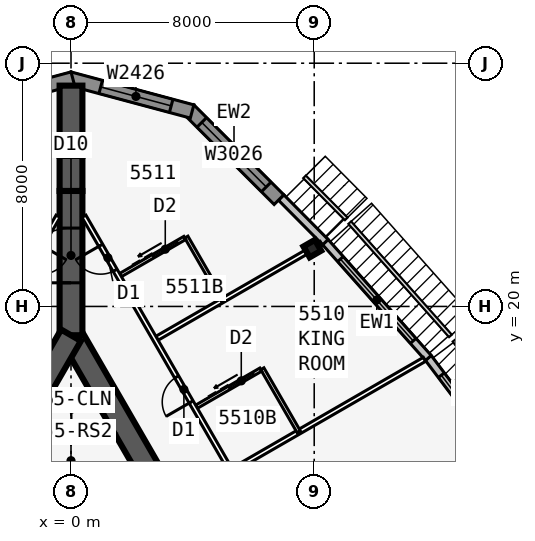
"""IFC4 building model, lengths in metres.
Left out: names, types, materials, properties, quantities, classifications, styles, units other than length and angle.
Written with IfcOpenShell. Run it as: python <this file> out.ifc"""

import sys

from ifc_helpers import new_model, si_unit, direction, frame, frame_2d, origin, origin_2d, place, context, subcontext, project, spatial, polyline, rectangle, i_section, outline, extrude, element, fill, save


model = new_model("IFC4")
c1 = context("Model", 3, precision=1e-05, world=origin(), true_north=direction((0.0, 1.0)))
c2 = subcontext(c1, "Body", "Model", "MODEL_VIEW")
j1 = project(units=[si_unit("LENGTHUNIT", "METRE"), si_unit("PLANEANGLEUNIT", "RADIAN")], contexts=[c1])
p1 = place(None, origin())
s1 = spatial("IfcSite", under=j1, at=p1, CompositionType="ELEMENT")
p2 = place(p1, origin())
s2 = spatial("IfcBuilding", under=s1, at=p2, CompositionType="ELEMENT")
p3 = place(p2, frame((0.0, 0.0, 208.1)))
s3 = spatial("IfcBuildingStorey", under=s2, at=p3, CompositionType="ELEMENT", Elevation=208.1)
p4 = place(p3, frame((16.5, -9.526, 0.0), z_axis=(0.0, 0.0, 1.0), x_axis=(-0.499999749417, 0.866025548458, 0.0)))
e1 = element("IfcWall", 1, at=p4, inside=s3, PredefinedType="SHEAR", context=c2, shape_type="SweptSolid", body=[
    extrude(rectangle(XDim=33.0, YDim=0.75, at=frame_2d((16.5, 0.0))), origin(), (0.0, 0.0, 1.0), 3.6),
])
p5 = place(p4, frame((14.15, 0.0, 0.0)))
e2 = element("IfcOpeningElement", 2, at=p5, cuts=e1, PredefinedType="OPENING", context=c2, shape_type="SweptSolid", body=[
    extrude(rectangle(XDim=1.8, YDim=2.13, at=frame_2d((0.9, 1.065))), frame((0.0, 0.385, 0.0), z_axis=(0.0, -1.0, 0.0), x_axis=(1.0, 0.0, 0.0)), (0.0, 0.0, 1.0), 0.77),
])
p6 = place(p4, frame((12.6, 0.0, 0.0)))
e3 = element("IfcOpeningElement", 3, at=p6, cuts=e1, PredefinedType="OPENING", context=c2, shape_type="SweptSolid", body=[
    extrude(rectangle(XDim=1.0, YDim=2.13, at=frame_2d((0.5, 1.065))), frame((0.0, 0.385, 0.0), z_axis=(0.0, -1.0, 0.0), x_axis=(1.0, 0.0, 0.0)), (0.0, 0.0, 1.0), 0.77),
])
p7 = place(p3, frame((0.0, 19.052, 0.0), z_axis=(0.0, 0.0, 1.0), x_axis=(-0.499999749417, -0.866025548458, 0.0)))
e4 = element("IfcWall", 4, at=p7, inside=s3, PredefinedType="SHEAR", context=c2, shape_type="SweptSolid", body=[
    extrude(rectangle(XDim=33.0, YDim=0.75, at=frame_2d((16.5, 0.0))), origin(), (0.0, 0.0, 1.0), 3.6),
])
p8 = place(p7, frame((14.15, 0.0, 0.0)))
e5 = element("IfcOpeningElement", 5, at=p8, cuts=e4, PredefinedType="OPENING", context=c2, shape_type="SweptSolid", body=[
    extrude(rectangle(XDim=1.8, YDim=2.13, at=frame_2d((0.9, 1.065))), frame((0.0, 0.385, 0.0), z_axis=(0.0, -1.0, 0.0), x_axis=(1.0, 0.0, 0.0)), (0.0, 0.0, 1.0), 0.77),
])
p9 = place(p7, frame((12.6, 0.0, 0.0)))
e6 = element("IfcOpeningElement", 6, at=p9, cuts=e4, PredefinedType="OPENING", context=c2, shape_type="SweptSolid", body=[
    extrude(rectangle(XDim=1.0, YDim=2.13, at=frame_2d((0.5, 1.065))), frame((0.0, 0.385, 0.0), z_axis=(0.0, -1.0, 0.0), x_axis=(1.0, 0.0, 0.0)), (0.0, 0.0, 1.0), 0.77),
])
p10 = place(p3, frame((0.0, 19.052, 0.0), z_axis=(0.0, 0.0, 1.0), x_axis=(0.0, 1.0, 0.0)))
e7 = element("IfcWall", 7, at=p10, inside=s3, PredefinedType="SHEAR", context=c2, shape_type="SweptSolid", body=[
    extrude(rectangle(XDim=4.746, YDim=0.75, at=frame_2d((2.373, 0.0))), origin(), (0.0, 0.0, 1.0), 3.6),
])
p11 = place(p10, frame((1.725, 0.0, 0.0)))
e8 = element("IfcOpeningElement", 8, at=p11, cuts=e7, PredefinedType="OPENING", context=c2, shape_type="SweptSolid", body=[
    extrude(rectangle(XDim=1.8, YDim=2.13, at=frame_2d((0.9, 1.065))), frame((0.0, 0.385, 0.0), z_axis=(0.0, -1.0, 0.0), x_axis=(1.0, 0.0, 0.0)), (0.0, 0.0, 1.0), 0.77),
])
p12 = place(p3, frame((0.0, 23.799, 0.0), z_axis=(0.0, 0.0, 1.0), x_axis=(0.0, 1.0, 0.0)))
e9 = element("IfcWall", 9, at=p12, inside=s3, PredefinedType="SHEAR", context=c2, shape_type="SweptSolid", body=[
    extrude(rectangle(XDim=1.155, YDim=0.75, at=frame_2d((0.577, 0.0))), origin(), (0.0, 0.0, 1.0), 3.6),
])
p13 = place(p3, frame((0.0, 24.953, 0.0), z_axis=(0.0, 0.0, 1.0), x_axis=(0.0, 1.0, 0.0)))
e10 = element("IfcWall", 10, at=p13, inside=s3, PredefinedType="SHEAR", context=c2, shape_type="SweptSolid", body=[
    extrude(rectangle(XDim=2.309, YDim=0.75, at=frame_2d((1.155, 0.0))), origin(), (0.0, 0.0, 1.0), 3.6),
])
p14 = place(p3, frame((7.937, 21.903, 0.0), z_axis=(0.0, 0.0, 1.0), x_axis=(-0.5, 0.866025403784, 0.0)))
e11 = element("IfcColumn", 11, at=p14, inside=s3, PredefinedType="COLUMN", context=c2, shape_type="SweptSolid", body=[
    extrude(i_section(OverallWidth=0.411, OverallDepth=0.434, WebThickness=0.036, FlangeThickness=0.057, at=origin_2d()), origin(), (0.0, 0.0, 1.0), 3.6),
])
p15 = place(p3, frame((14.783, 14.291, 0.0), z_axis=(0.0, 0.0, 1.0), x_axis=(-0.602408653511, 0.798187831388, 0.0)))
e12 = element("IfcWall", 12, at=p15, inside=s3, PredefinedType="STANDARD", context=c2, shape_type="SweptSolid", body=[
    extrude(rectangle(XDim=5.038, YDim=0.25, at=frame_2d((2.519, 0.0))), origin(), (0.0, 0.0, 1.0), 3.435),
])
p16 = place(p15, frame((0.719, 0.0, 0.45)))
e13 = element("IfcOpeningElement", 13, at=p16, cuts=e12, PredefinedType="OPENING", context=c2, shape_type="SweptSolid", body=[
    extrude(rectangle(XDim=3.6, YDim=2.6, at=frame_2d((1.8, 1.3))), frame((0.0, 0.135, 0.0), z_axis=(0.0, -1.0, 0.0), x_axis=(1.0, 0.0, 0.0)), (0.0, 0.0, 1.0), 0.27),
])
p17 = place(p3, frame((11.754, 18.304, 0.0), z_axis=(0.0, 0.0, 1.0), x_axis=(-0.664348996191, 0.747422511876, 0.0)))
e14 = element("IfcWall", 14, at=p17, inside=s3, PredefinedType="STANDARD", context=c2, shape_type="SweptSolid", body=[
    extrude(rectangle(XDim=5.105, YDim=0.25, at=frame_2d((2.552, 0.0))), origin(), (0.0, 0.0, 1.0), 3.435),
])
p18 = place(p17, frame((0.752, 0.0, 0.45)))
e15 = element("IfcOpeningElement", 15, at=p18, cuts=e14, PredefinedType="OPENING", context=c2, shape_type="SweptSolid", body=[
    extrude(rectangle(XDim=3.6, YDim=2.6, at=frame_2d((1.8, 1.3))), frame((0.0, 0.135, 0.0), z_axis=(0.0, -1.0, 0.0), x_axis=(1.0, 0.0, 0.0)), (0.0, 0.0, 1.0), 0.27),
])
p19 = place(p3, frame((8.368, 22.115, 0.0), z_axis=(0.0, 0.0, 1.0), x_axis=(-0.704149946111, 0.710051303352, 0.0)))
e16 = element("IfcWall", 16, at=p19, inside=s3, PredefinedType="STANDARD", context=c2, shape_type="SweptSolid", body=[
    extrude(rectangle(XDim=2.069, YDim=0.25, at=frame_2d((1.034, 0.0))), origin(), (0.0, 0.0, 1.0), 3.435),
])
p20 = place(p3, frame((6.841, 23.512, 0.0), z_axis=(0.0, 0.0, 1.0), x_axis=(-0.707106781187, 0.707106781187, 0.0)))
e17 = element("IfcWall", 17, at=p20, inside=s3, PredefinedType="SOLIDWALL", context=c2, shape_type="SweptSolid", body=[
    extrude(rectangle(XDim=4.184, YDim=0.45, at=frame_2d((2.092, 0.0))), origin(), (0.0, 0.0, 1.0), 3.435),
])
p21 = place(p20, frame((0.592, 0.0, 0.45)))
e18 = element("IfcOpeningElement", 18, at=p21, cuts=e17, PredefinedType="OPENING", context=c2, shape_type="SweptSolid", body=[
    extrude(rectangle(XDim=3.0, YDim=2.6, at=frame_2d((1.5, 1.3))), frame((0.0, 0.235, 0.0), z_axis=(0.0, -1.0, 0.0), x_axis=(1.0, 0.0, 0.0)), (0.0, 0.0, 1.0), 0.47),
])
p22 = place(p3, frame((3.983, 26.413, 0.0), z_axis=(0.0, 0.0, 1.0), x_axis=(-0.965920442324, 0.258839137498, 0.0)))
e19 = element("IfcWall", 19, at=p22, inside=s3, PredefinedType="SOLIDWALL", context=c2, shape_type="SweptSolid", body=[
    extrude(outline(polyline([(4.184, 0.225), (4.124, 0.225), (3.706, 0.113), (3.676, 0.225), (0.0, 0.225), (0.0, -0.225), (4.184, -0.225), (4.184, 0.225)])), origin(), (0.0, 0.0, 1.0), 3.435),
])
p23 = place(p22, frame((0.713, 0.0, 0.45)))
e20 = element("IfcOpeningElement", 20, at=p23, cuts=e19, PredefinedType="OPENING", context=c2, shape_type="SweptSolid", body=[
    extrude(rectangle(XDim=2.4, YDim=2.6, at=frame_2d((1.2, 1.3))), frame((0.0, 0.235, 0.0), z_axis=(0.0, -1.0, 0.0), x_axis=(1.0, 0.0, 0.0)), (0.0, 0.0, 1.0), 0.47),
])
p24 = place(p3, frame((0.058, 27.496, 0.0), z_axis=(0.0, 0.0, 1.0), x_axis=(-0.965920442324, -0.258839137498, 0.0)))
e21 = element("IfcWall", 21, at=p24, inside=s3, PredefinedType="SOLIDWALL", context=c2, shape_type="SweptSolid", body=[
    extrude(outline(polyline([(4.184, 0.225), (0.509, 0.225), (0.479, 0.113), (0.06, 0.225), (0.0, 0.225), (0.0, -0.225), (4.184, -0.225), (4.184, 0.225)])), origin(), (0.0, 0.0, 1.0), 3.435),
])
p25 = place(p24, frame((1.071, 0.0, 0.45)))
e22 = element("IfcOpeningElement", 22, at=p25, cuts=e21, PredefinedType="OPENING", context=c2, shape_type="SweptSolid", body=[
    extrude(rectangle(XDim=2.4, YDim=2.6, at=frame_2d((1.2, 1.3))), frame((0.0, 0.235, 0.0), z_axis=(0.0, -1.0, 0.0), x_axis=(1.0, 0.0, 0.0)), (0.0, 0.0, 1.0), 0.47),
])
p26 = place(p3, frame((20.102, -11.115, 0.0), z_axis=(0.0, 0.0, 1.0), x_axis=(-0.500000265775, 0.866025250339, 0.0)))
e23 = element("IfcWall", 23, at=p26, inside=s3, PredefinedType="PARTITIONING", context=c2, shape_type="SweptSolid", body=[
    extrude(rectangle(XDim=39.354, YDim=0.15, at=frame_2d((19.677, 0.0))), origin(), (0.0, 0.0, 1.0), 3.435),
])
p27 = place(p26, frame((1.665, 0.0, 0.0)))
e24 = element("IfcOpeningElement", 24, at=p27, cuts=e23, PredefinedType="OPENING", context=c2, shape_type="SweptSolid", body=[
    extrude(rectangle(XDim=0.95, YDim=2.13, at=frame_2d((0.475, 1.065))), frame((0.0, 0.085, 0.0), z_axis=(0.0, -1.0, 0.0), x_axis=(1.0, 0.0, 0.0)), (0.0, 0.0, 1.0), 0.17),
])
p28 = place(p26, frame((12.902, 0.0, 0.0)))
e25 = element("IfcOpeningElement", 25, at=p28, cuts=e23, PredefinedType="OPENING", context=c2, shape_type="SweptSolid", body=[
    extrude(rectangle(XDim=0.95, YDim=2.13, at=frame_2d((0.475, 1.065))), frame((0.0, 0.085, 0.0), z_axis=(0.0, -1.0, 0.0), x_axis=(1.0, 0.0, 0.0)), (0.0, 0.0, 1.0), 0.17),
])
p29 = place(p26, frame((17.302, 0.0, 0.0)))
e26 = element("IfcOpeningElement", 26, at=p29, cuts=e23, PredefinedType="OPENING", context=c2, shape_type="SweptSolid", body=[
    extrude(rectangle(XDim=0.95, YDim=2.13, at=frame_2d((0.475, 1.065))), frame((0.0, 0.085, 0.0), z_axis=(0.0, -1.0, 0.0), x_axis=(1.0, 0.0, 0.0)), (0.0, 0.0, 1.0), 0.17),
])
p30 = place(p26, frame((22.902, 0.0, 0.0)))
e27 = element("IfcOpeningElement", 27, at=p30, cuts=e23, PredefinedType="OPENING", context=c2, shape_type="SweptSolid", body=[
    extrude(rectangle(XDim=0.95, YDim=2.13, at=frame_2d((0.475, 1.065))), frame((0.0, 0.085, 0.0), z_axis=(0.0, -1.0, 0.0), x_axis=(1.0, 0.0, 0.0)), (0.0, 0.0, 1.0), 0.17),
])
p31 = place(p26, frame((32.302, 0.0, 0.0)))
e28 = element("IfcOpeningElement", 28, at=p31, cuts=e23, PredefinedType="OPENING", context=c2, shape_type="SweptSolid", body=[
    extrude(rectangle(XDim=0.95, YDim=2.13, at=frame_2d((0.475, 1.065))), frame((0.0, 0.085, 0.0), z_axis=(0.0, -1.0, 0.0), x_axis=(1.0, 0.0, 0.0)), (0.0, 0.0, 1.0), 0.17),
])
p32 = place(p26, frame((37.302, 0.0, 0.0)))
e29 = element("IfcOpeningElement", 29, at=p32, cuts=e23, PredefinedType="OPENING", context=c2, shape_type="SweptSolid", body=[
    extrude(rectangle(XDim=0.95, YDim=2.13, at=frame_2d((0.475, 1.065))), frame((0.0, 0.085, 0.0), z_axis=(0.0, -1.0, 0.0), x_axis=(1.0, 0.0, 0.0)), (0.0, 0.0, 1.0), 0.17),
])
p33 = place(p3, frame((5.329, 14.623, 0.0), z_axis=(0.0, 0.0, 1.0), x_axis=(0.866017877653, 0.500013035415, 0.0)))
e30 = element("IfcWall", 30, at=p33, inside=s3, PredefinedType="PARTITIONING", context=c2, shape_type="SweptSolid", body=[
    extrude(rectangle(XDim=7.273, YDim=0.15, at=frame_2d((3.636, 0.0))), origin(), (0.0, 0.0, 1.0), 2.589),
])
p34 = place(p3, frame((2.829, 18.954, 0.0), z_axis=(0.0, 0.0, 1.0), x_axis=(0.866026604282, 0.499997920671, 0.0)))
e31 = element("IfcWall", 31, at=p34, inside=s3, PredefinedType="PARTITIONING", context=c2, shape_type="SweptSolid", body=[
    extrude(rectangle(XDim=6.24, YDim=0.15, at=frame_2d((3.12, 0.0))), origin(), (0.0, 0.0, 1.0), 2.589),
])
p35 = place(p3, frame((7.493, 15.873, 0.0), z_axis=(0.0, 0.0, 1.0), x_axis=(-0.499957262057, 0.866050077142, 0.0)))
e32 = element("IfcWall", 32, at=p35, inside=s3, PredefinedType="PLUMBINGWALL", context=c2, shape_type="SweptSolid", body=[
    extrude(rectangle(XDim=2.4, YDim=0.12, at=frame_2d((1.2, 0.0))), origin(), (0.0, 0.0, 1.0), 3.435),
])
p36 = place(p3, frame((4.128, 16.702, 0.0), z_axis=(0.0, 0.0, 1.0), x_axis=(0.866048967903, 0.499959183527, 0.0)))
e33 = element("IfcWall", 33, at=p36, inside=s3, PredefinedType="PLUMBINGWALL", context=c2, shape_type="SweptSolid", body=[
    extrude(rectangle(XDim=2.44, YDim=0.12, at=frame_2d((1.22, 0.0))), origin(), (0.0, 0.0, 1.0), 3.435),
])
p37 = place(p36, frame((1.25, 0.0, 0.0)))
e34 = element("IfcOpeningElement", 34, at=p37, cuts=e33, PredefinedType="OPENING", context=c2, shape_type="SweptSolid", body=[
    extrude(rectangle(XDim=0.9, YDim=2.13, at=frame_2d((0.45, 1.065))), frame((0.0, 0.07, 0.0), z_axis=(0.0, -1.0, 0.0), x_axis=(1.0, 0.0, 0.0)), (0.0, 0.0, 1.0), 0.14),
])
p38 = place(p3, frame((4.993, 20.204, 0.0), z_axis=(0.0, 0.0, 1.0), x_axis=(-0.500001309137, 0.866024647952, 0.0)))
e35 = element("IfcWall", 35, at=p38, inside=s3, PredefinedType="PLUMBINGWALL", context=c2, shape_type="SweptSolid", body=[
    extrude(rectangle(XDim=2.4, YDim=0.12, at=frame_2d((1.2, 0.0))), origin(), (0.0, 0.0, 1.0), 3.435),
])
p39 = place(p3, frame((1.628, 21.032, 0.0), z_axis=(0.0, 0.0, 1.0), x_axis=(0.866048967903, 0.499959183527, 0.0)))
e36 = element("IfcWall", 36, at=p39, inside=s3, PredefinedType="PLUMBINGWALL", context=c2, shape_type="SweptSolid", body=[
    extrude(rectangle(XDim=2.44, YDim=0.12, at=frame_2d((1.22, 0.0))), origin(), (0.0, 0.0, 1.0), 3.435),
])
p40 = place(p39, frame((1.25, 0.0, 0.0)))
e37 = element("IfcOpeningElement", 37, at=p40, cuts=e36, PredefinedType="OPENING", context=c2, shape_type="SweptSolid", body=[
    extrude(rectangle(XDim=0.9, YDim=2.13, at=frame_2d((0.45, 1.065))), frame((0.0, 0.07, 0.0), z_axis=(0.0, -1.0, 0.0), x_axis=(1.0, 0.0, 0.0)), (0.0, 0.0, 1.0), 0.14),
])
p41 = place(p3, frame((-0.425, 22.966, 0.0), z_axis=(0.0, 0.0, 1.0), x_axis=(-0.500000265775, -0.866025250339, 0.0)))
e38 = element("IfcWall", 38, at=p41, inside=s3, PredefinedType="PARTITIONING", context=c2, shape_type="SweptSolid", body=[
    extrude(rectangle(XDim=39.354, YDim=0.15, at=frame_2d((19.677, 0.0))), origin(), (0.0, 0.0, 1.0), 3.435),
])
p42 = place(p41, frame((1.102, 0.0, 0.0)))
e39 = element("IfcOpeningElement", 39, at=p42, cuts=e38, PredefinedType="OPENING", context=c2, shape_type="SweptSolid", body=[
    extrude(rectangle(XDim=0.95, YDim=2.13, at=frame_2d((0.475, 1.065))), frame((0.0, 0.085, 0.0), z_axis=(0.0, -1.0, 0.0), x_axis=(1.0, 0.0, 0.0)), (0.0, 0.0, 1.0), 0.17),
])
p43 = place(p41, frame((7.902, 0.0, 0.0)))
e40 = element("IfcOpeningElement", 40, at=p43, cuts=e38, PredefinedType="OPENING", context=c2, shape_type="SweptSolid", body=[
    extrude(rectangle(XDim=0.95, YDim=2.13, at=frame_2d((0.475, 1.065))), frame((0.0, 0.085, 0.0), z_axis=(0.0, -1.0, 0.0), x_axis=(1.0, 0.0, 0.0)), (0.0, 0.0, 1.0), 0.17),
])
p44 = place(p41, frame((17.302, 0.0, 0.0)))
e41 = element("IfcOpeningElement", 41, at=p44, cuts=e38, PredefinedType="OPENING", context=c2, shape_type="SweptSolid", body=[
    extrude(rectangle(XDim=0.95, YDim=2.13, at=frame_2d((0.475, 1.065))), frame((0.0, 0.085, 0.0), z_axis=(0.0, -1.0, 0.0), x_axis=(1.0, 0.0, 0.0)), (0.0, 0.0, 1.0), 0.17),
])
p45 = place(p41, frame((26.702, 0.0, 0.0)))
e42 = element("IfcOpeningElement", 42, at=p45, cuts=e38, PredefinedType="OPENING", context=c2, shape_type="SweptSolid", body=[
    extrude(rectangle(XDim=0.95, YDim=2.13, at=frame_2d((0.475, 1.065))), frame((0.0, 0.085, 0.0), z_axis=(0.0, -1.0, 0.0), x_axis=(1.0, 0.0, 0.0)), (0.0, 0.0, 1.0), 0.17),
])
p46 = place(p41, frame((37.302, 0.0, 0.0)))
e43 = element("IfcOpeningElement", 43, at=p46, cuts=e38, PredefinedType="OPENING", context=c2, shape_type="SweptSolid", body=[
    extrude(rectangle(XDim=0.95, YDim=2.13, at=frame_2d((0.475, 1.065))), frame((0.0, 0.085, 0.0), z_axis=(0.0, -1.0, 0.0), x_axis=(1.0, 0.0, 0.0)), (0.0, 0.0, 1.0), 0.17),
])
p47 = place(p3, frame((-1.501, 15.703, 0.0), z_axis=(0.0, 0.0, 1.0), x_axis=(1.0, 0.0, 0.0)))
e44 = element("IfcWall", 44, at=p47, inside=s3, PredefinedType="SOLIDWALL", context=c2, shape_type="SweptSolid", body=[
    extrude(rectangle(XDim=3.002, YDim=0.2, at=frame_2d((1.501, 0.0))), origin(), (0.0, 0.0, 1.0), 3.435),
])
p48 = place(p16, origin())
e45 = element("IfcWindow", 45, at=p48, inside=s3, PartitioningType="SINGLE_PANEL", PredefinedType="WINDOW", context=c2, shape_type="SweptSolid", body=[
    extrude(rectangle(XDim=3.6, YDim=2.6, at=frame_2d((1.8, 1.3))), frame((0.0, 0.03, 0.0), z_axis=(0.0, -1.0, 0.0), x_axis=(1.0, 0.0, 0.0)), (0.0, 0.0, 1.0), 0.06),
])
fill(e13, e45)
p49 = place(p18, origin())
e46 = element("IfcWindow", 46, at=p49, inside=s3, PartitioningType="SINGLE_PANEL", PredefinedType="WINDOW", context=c2, shape_type="SweptSolid", body=[
    extrude(rectangle(XDim=3.6, YDim=2.6, at=frame_2d((1.8, 1.3))), frame((0.0, 0.03, 0.0), z_axis=(0.0, -1.0, 0.0), x_axis=(1.0, 0.0, 0.0)), (0.0, 0.0, 1.0), 0.06),
])
fill(e15, e46)
p50 = place(p21, origin())
e47 = element("IfcWindow", 47, at=p50, inside=s3, PartitioningType="SINGLE_PANEL", PredefinedType="WINDOW", context=c2, shape_type="SweptSolid", body=[
    extrude(rectangle(XDim=3.0, YDim=2.6, at=frame_2d((1.5, 1.3))), frame((0.0, 0.03, 0.0), z_axis=(0.0, -1.0, 0.0), x_axis=(1.0, 0.0, 0.0)), (0.0, 0.0, 1.0), 0.06),
])
fill(e18, e47)
p51 = place(p23, origin())
e48 = element("IfcWindow", 48, at=p51, inside=s3, PartitioningType="SINGLE_PANEL", PredefinedType="WINDOW", context=c2, shape_type="SweptSolid", body=[
    extrude(rectangle(XDim=2.4, YDim=2.6, at=frame_2d((1.2, 1.3))), frame((0.0, 0.03, 0.0), z_axis=(0.0, -1.0, 0.0), x_axis=(1.0, 0.0, 0.0)), (0.0, 0.0, 1.0), 0.06),
])
fill(e20, e48)
p52 = place(p37, origin())
e49 = element("IfcDoor", 49, at=p52, inside=s3, OperationType="SLIDING_TO_LEFT", PredefinedType="DOOR", context=c2, shape_type="SweptSolid", body=[
    extrude(rectangle(XDim=0.9, YDim=2.13, at=frame_2d((0.45, 1.065))), frame((0.0, 0.025, 0.0), z_axis=(0.0, -1.0, 0.0), x_axis=(1.0, 0.0, 0.0)), (0.0, 0.0, 1.0), 0.05),
])
fill(e34, e49)
p53 = place(p31, origin())
e50 = element("IfcDoor", 50, at=p53, inside=s3, OperationType="SINGLE_SWING_LEFT", PredefinedType="DOOR", context=c2, shape_type="SweptSolid", body=[
    extrude(rectangle(XDim=0.95, YDim=2.13, at=frame_2d((0.475, 1.065))), frame((0.0, 0.025, 0.0), z_axis=(0.0, -1.0, 0.0), x_axis=(1.0, 0.0, 0.0)), (0.0, 0.0, 1.0), 0.05),
])
fill(e28, e50)
p54 = place(p40, origin())
e51 = element("IfcDoor", 51, at=p54, inside=s3, OperationType="SLIDING_TO_LEFT", PredefinedType="DOOR", context=c2, shape_type="SweptSolid", body=[
    extrude(rectangle(XDim=0.9, YDim=2.13, at=frame_2d((0.45, 1.065))), frame((0.0, 0.025, 0.0), z_axis=(0.0, -1.0, 0.0), x_axis=(1.0, 0.0, 0.0)), (0.0, 0.0, 1.0), 0.05),
])
fill(e37, e51)
p55 = place(p32, origin())
e52 = element("IfcDoor", 52, at=p55, inside=s3, OperationType="SINGLE_SWING_RIGHT", PredefinedType="DOOR", context=c2, shape_type="SweptSolid", body=[
    extrude(rectangle(XDim=0.95, YDim=2.13, at=frame_2d((0.475, 1.065))), frame((0.0, 0.025, 0.0), z_axis=(0.0, -1.0, 0.0), x_axis=(1.0, 0.0, 0.0)), (0.0, 0.0, 1.0), 0.05),
])
fill(e29, e52)
p56 = place(p11, origin())
e53 = element("IfcDoor", 53, at=p56, inside=s3, OperationType="DOUBLE_DOOR_DOUBLE_SWING", PredefinedType="DOOR", context=c2, shape_type="SweptSolid", body=[
    extrude(rectangle(XDim=1.8, YDim=2.13, at=frame_2d((0.9, 1.065))), frame((0.0, 0.025, 0.0), z_axis=(0.0, -1.0, 0.0), x_axis=(1.0, 0.0, 0.0)), (0.0, 0.0, 1.0), 0.05),
])
fill(e8, e53)
save(model, sys.argv[1])
